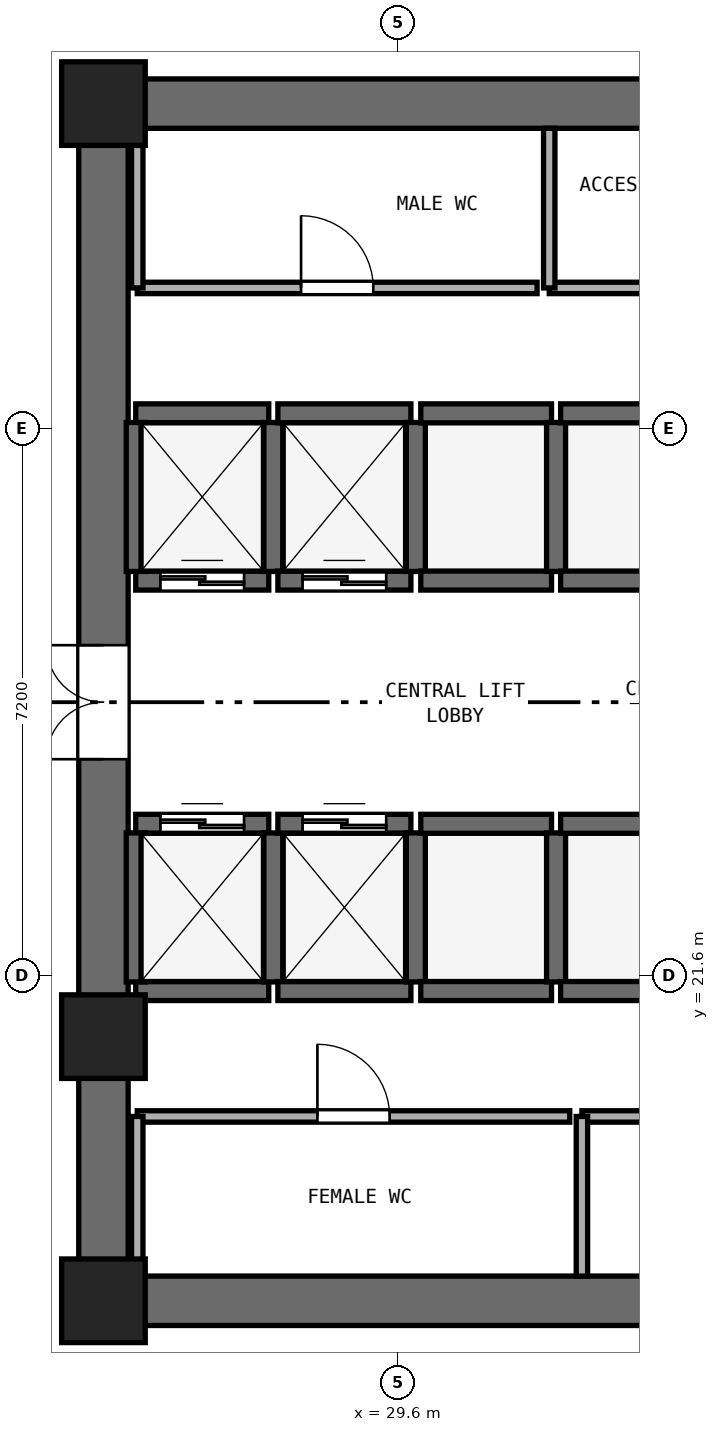
"""IFC4 building model, lengths in metres.
Left out: names, types, materials, properties, quantities, classifications, styles, units other than length and angle.
Written with IfcOpenShell. Run it as: python <this file> out.ifc"""

import sys

from ifc_helpers import new_model, si_unit, direction, frame, frame_2d, origin, origin_2d, place, context, subcontext, project, spatial, rectangle, extrude, element, fill, save


model = new_model("IFC4")
c1 = context("Model", 3, precision=1e-05, world=origin(), true_north=direction((0.0, 1.0)))
c2 = subcontext(c1, "Body", "Model", "MODEL_VIEW")
j1 = project(units=[si_unit("LENGTHUNIT", "METRE"), si_unit("PLANEANGLEUNIT", "RADIAN")], contexts=[c1])
p1 = place(None, origin())
s1 = spatial("IfcSite", under=j1, at=p1, CompositionType="ELEMENT")
p2 = place(p1, origin())
s2 = spatial("IfcBuilding", under=s1, at=p2, CompositionType="ELEMENT")
p3 = place(p2, frame((0.0, 0.0, 28.8)))
s3 = spatial("IfcBuildingStorey", under=s2, at=p3, CompositionType="ELEMENT", Elevation=28.8)
for number, where, z_axis, x_axis in (
    (1, (25.4, 17.325, 0.0), (0.0, 0.0, 1.0), (1.0, 0.0, 0.0)),
    (2, (25.4, 33.075, 0.0), (0.0, 0.0, 1.0), (1.0, 0.0, 0.0)),
):
    element("IfcWall", number, at=place(p3, frame(where, z_axis=z_axis, x_axis=x_axis)), inside=s3, PredefinedType="SHEAR", context=c2, shape_type="SweptSolid", body=[
        extrude(rectangle(XDim=23.2, YDim=0.65, at=frame_2d((11.6, 0.0))), origin(), (0.0, 0.0, 1.0), 3.525),
    ])
p4 = place(p3, frame((25.725, 17.65, 0.0), z_axis=(0.0, 0.0, 1.0), x_axis=(0.0, 1.0, 0.0)))
e3 = element("IfcWall", 3, at=p4, inside=s3, PredefinedType="SHEAR", context=c2, shape_type="SweptSolid", body=[
    extrude(rectangle(XDim=15.1, YDim=0.65, at=frame_2d((7.55, 0.0))), origin(), (0.0, 0.0, 1.0), 3.525),
])
p5 = place(p4, frame((6.8, 0.0, 0.0)))
e4 = element("IfcOpeningElement", 4, at=p5, cuts=e3, PredefinedType="OPENING", context=c2, shape_type="SweptSolid", body=[
    extrude(rectangle(XDim=1.5, YDim=2.15, at=frame_2d((0.75, 1.075))), frame((0.0, 0.335, 0.0), z_axis=(0.0, -1.0, 0.0), x_axis=(1.0, 0.0, 0.0)), (0.0, 0.0, 1.0), 0.67),
])
for number, where, z_axis, x_axis in (
    (5, (25.725, 17.325, 0.0), (0.0, 0.0, 1.0), (1.0, 0.0, 0.0)),
    (6, (25.725, 33.075, 0.0), (0.0, 0.0, 1.0), (1.0, 0.0, 0.0)),
    (7, (25.725, 20.8, 0.0), (0.0, 0.0, 1.0), (1.0, 0.0, 0.0)),
):
    element("IfcColumn", number, at=place(p3, frame(where, z_axis=z_axis, x_axis=x_axis)), inside=s3, PredefinedType="PILASTER", context=c2, shape_type="SweptSolid", body=[
        extrude(rectangle(XDim=1.1, YDim=1.1, at=origin_2d()), origin(), (0.0, 0.0, 1.0), 3.8),
    ])
p6 = place(p3, frame((26.15, 26.8, 0.0), z_axis=(0.0, 0.0, 1.0), x_axis=(1.0, 0.0, 0.0)))
e8 = element("IfcWall", 8, at=p6, inside=s3, PredefinedType="SHEAR", context=c2, shape_type="SweptSolid", body=[
    extrude(rectangle(XDim=1.75, YDim=0.25, at=frame_2d((0.875, 0.0))), origin(), (0.0, 0.0, 1.0), 3.525),
])
p7 = place(p6, frame((0.325, 0.0, 0.0)))
e9 = element("IfcOpeningElement", 9, at=p7, cuts=e8, PredefinedType="OPENING", context=c2, shape_type="SweptSolid", body=[
    extrude(rectangle(XDim=1.1, YDim=2.15, at=frame_2d((0.55, 1.075))), frame((0.0, 0.135, 0.0), z_axis=(0.0, -1.0, 0.0), x_axis=(1.0, 0.0, 0.0)), (0.0, 0.0, 1.0), 0.27),
])
p8 = place(p3, frame((26.15, 29.0, 0.0), z_axis=(0.0, 0.0, 1.0), x_axis=(1.0, 0.0, 0.0)))
e10 = element("IfcWall", 10, at=p8, inside=s3, PredefinedType="SHEAR", context=c2, shape_type="SweptSolid", body=[
    extrude(rectangle(XDim=1.75, YDim=0.25, at=frame_2d((0.875, 0.0))), origin(), (0.0, 0.0, 1.0), 3.525),
])
for number, where, z_axis, x_axis in (
    (11, (26.15, 26.92, 0.0), (0.0, 0.0, 1.0), (0.0, 1.0, 0.0)),
    (12, (27.96, 26.92, 0.0), (0.0, 0.0, 1.0), (0.0, 1.0, 0.0)),
):
    element("IfcWall", number, at=place(p3, frame(where, z_axis=z_axis, x_axis=x_axis)), inside=s3, PredefinedType="SHEAR", context=c2, shape_type="SweptSolid", body=[
        extrude(rectangle(XDim=1.96, YDim=0.25, at=frame_2d((0.98, 0.0))), origin(), (0.0, 0.0, 1.0), 3.525),
    ])
p9 = place(p3, frame((28.02, 26.8, 0.0), z_axis=(0.0, 0.0, 1.0), x_axis=(1.0, 0.0, 0.0)))
e13 = element("IfcWall", 13, at=p9, inside=s3, PredefinedType="SHEAR", context=c2, shape_type="SweptSolid", body=[
    extrude(rectangle(XDim=1.75, YDim=0.25, at=frame_2d((0.875, 0.0))), origin(), (0.0, 0.0, 1.0), 3.525),
])
p10 = place(p9, frame((0.325, 0.0, 0.0)))
e14 = element("IfcOpeningElement", 14, at=p10, cuts=e13, PredefinedType="OPENING", context=c2, shape_type="SweptSolid", body=[
    extrude(rectangle(XDim=1.1, YDim=2.15, at=frame_2d((0.55, 1.075))), frame((0.0, 0.135, 0.0), z_axis=(0.0, -1.0, 0.0), x_axis=(1.0, 0.0, 0.0)), (0.0, 0.0, 1.0), 0.27),
])
p11 = place(p3, frame((28.02, 29.0, 0.0), z_axis=(0.0, 0.0, 1.0), x_axis=(1.0, 0.0, 0.0)))
e15 = element("IfcWall", 15, at=p11, inside=s3, PredefinedType="SHEAR", context=c2, shape_type="SweptSolid", body=[
    extrude(rectangle(XDim=1.75, YDim=0.25, at=frame_2d((0.875, 0.0))), origin(), (0.0, 0.0, 1.0), 3.525),
])
p12 = place(p3, frame((29.835, 26.92, 0.0), z_axis=(0.0, 0.0, 1.0), x_axis=(0.0, 1.0, 0.0)))
e16 = element("IfcWall", 16, at=p12, inside=s3, PredefinedType="SHEAR", context=c2, shape_type="SweptSolid", body=[
    extrude(rectangle(XDim=1.96, YDim=0.25, at=frame_2d((0.98, 0.0))), origin(), (0.0, 0.0, 1.0), 3.525),
])
p13 = place(p3, frame((26.15, 21.4, 0.0), z_axis=(0.0, 0.0, 1.0), x_axis=(1.0, 0.0, 0.0)))
e17 = element("IfcWall", 17, at=p13, inside=s3, PredefinedType="SHEAR", context=c2, shape_type="SweptSolid", body=[
    extrude(rectangle(XDim=1.75, YDim=0.25, at=frame_2d((0.875, 0.0))), origin(), (0.0, 0.0, 1.0), 3.525),
])
p14 = place(p3, frame((26.15, 23.6, 0.0), z_axis=(0.0, 0.0, 1.0), x_axis=(1.0, 0.0, 0.0)))
e18 = element("IfcWall", 18, at=p14, inside=s3, PredefinedType="SHEAR", context=c2, shape_type="SweptSolid", body=[
    extrude(rectangle(XDim=1.75, YDim=0.25, at=frame_2d((0.875, 0.0))), origin(), (0.0, 0.0, 1.0), 3.525),
])
p15 = place(p14, frame((0.325, 0.0, 0.0)))
e19 = element("IfcOpeningElement", 19, at=p15, cuts=e18, PredefinedType="OPENING", context=c2, shape_type="SweptSolid", body=[
    extrude(rectangle(XDim=1.1, YDim=2.15, at=frame_2d((0.55, 1.075))), frame((0.0, 0.135, 0.0), z_axis=(0.0, -1.0, 0.0), x_axis=(1.0, 0.0, 0.0)), (0.0, 0.0, 1.0), 0.27),
])
for number, where, z_axis, x_axis in (
    (20, (26.15, 21.52, 0.0), (0.0, 0.0, 1.0), (0.0, 1.0, 0.0)),
    (21, (27.96, 21.52, 0.0), (0.0, 0.0, 1.0), (0.0, 1.0, 0.0)),
):
    element("IfcWall", number, at=place(p3, frame(where, z_axis=z_axis, x_axis=x_axis)), inside=s3, PredefinedType="SHEAR", context=c2, shape_type="SweptSolid", body=[
        extrude(rectangle(XDim=1.96, YDim=0.25, at=frame_2d((0.98, 0.0))), origin(), (0.0, 0.0, 1.0), 3.525),
    ])
p16 = place(p3, frame((28.02, 21.4, 0.0), z_axis=(0.0, 0.0, 1.0), x_axis=(1.0, 0.0, 0.0)))
e22 = element("IfcWall", 22, at=p16, inside=s3, PredefinedType="SHEAR", context=c2, shape_type="SweptSolid", body=[
    extrude(rectangle(XDim=1.75, YDim=0.25, at=frame_2d((0.875, 0.0))), origin(), (0.0, 0.0, 1.0), 3.525),
])
p17 = place(p3, frame((28.02, 23.6, 0.0), z_axis=(0.0, 0.0, 1.0), x_axis=(1.0, 0.0, 0.0)))
e23 = element("IfcWall", 23, at=p17, inside=s3, PredefinedType="SHEAR", context=c2, shape_type="SweptSolid", body=[
    extrude(rectangle(XDim=1.75, YDim=0.25, at=frame_2d((0.875, 0.0))), origin(), (0.0, 0.0, 1.0), 3.525),
])
p18 = place(p17, frame((0.325, 0.0, 0.0)))
e24 = element("IfcOpeningElement", 24, at=p18, cuts=e23, PredefinedType="OPENING", context=c2, shape_type="SweptSolid", body=[
    extrude(rectangle(XDim=1.1, YDim=2.15, at=frame_2d((0.55, 1.075))), frame((0.0, 0.135, 0.0), z_axis=(0.0, -1.0, 0.0), x_axis=(1.0, 0.0, 0.0)), (0.0, 0.0, 1.0), 0.27),
])
p19 = place(p3, frame((29.835, 21.52, 0.0), z_axis=(0.0, 0.0, 1.0), x_axis=(0.0, 1.0, 0.0)))
e25 = element("IfcWall", 25, at=p19, inside=s3, PredefinedType="SHEAR", context=c2, shape_type="SweptSolid", body=[
    extrude(rectangle(XDim=1.96, YDim=0.25, at=frame_2d((0.98, 0.0))), origin(), (0.0, 0.0, 1.0), 3.525),
])
for number, where, z_axis, x_axis in (
    (26, (29.9, 21.4, 0.0), (0.0, 0.0, 1.0), (1.0, 0.0, 0.0)),
    (27, (29.9, 23.6, 0.0), (0.0, 0.0, 1.0), (1.0, 0.0, 0.0)),
):
    element("IfcWall", number, at=place(p3, frame(where, z_axis=z_axis, x_axis=x_axis)), inside=s3, PredefinedType="SHEAR", context=c2, shape_type="SweptSolid", body=[
        extrude(rectangle(XDim=1.72, YDim=0.25, at=frame_2d((0.86, 0.0))), origin(), (0.0, 0.0, 1.0), 3.525),
    ])
p20 = place(p3, frame((31.68, 21.52, 0.0), z_axis=(0.0, 0.0, 1.0), x_axis=(0.0, 1.0, 0.0)))
e28 = element("IfcWall", 28, at=p20, inside=s3, PredefinedType="SHEAR", context=c2, shape_type="SweptSolid", body=[
    extrude(rectangle(XDim=1.96, YDim=0.25, at=frame_2d((0.98, 0.0))), origin(), (0.0, 0.0, 1.0), 3.525),
])
for number, where, z_axis, x_axis in (
    (29, (31.74, 21.4, 0.0), (0.0, 0.0, 1.0), (1.0, 0.0, 0.0)),
    (30, (31.74, 23.6, 0.0), (0.0, 0.0, 1.0), (1.0, 0.0, 0.0)),
):
    element("IfcWall", number, at=place(p3, frame(where, z_axis=z_axis, x_axis=x_axis)), inside=s3, PredefinedType="SHEAR", context=c2, shape_type="SweptSolid", body=[
        extrude(rectangle(XDim=1.72, YDim=0.25, at=frame_2d((0.86, 0.0))), origin(), (0.0, 0.0, 1.0), 3.525),
    ])
for number, where, z_axis, x_axis in (
    (31, (29.9, 26.8, 0.0), (0.0, 0.0, 1.0), (1.0, 0.0, 0.0)),
    (32, (29.9, 29.0, 0.0), (0.0, 0.0, 1.0), (1.0, 0.0, 0.0)),
):
    element("IfcWall", number, at=place(p3, frame(where, z_axis=z_axis, x_axis=x_axis)), inside=s3, PredefinedType="SHEAR", context=c2, shape_type="SweptSolid", body=[
        extrude(rectangle(XDim=1.72, YDim=0.25, at=frame_2d((0.86, 0.0))), origin(), (0.0, 0.0, 1.0), 3.525),
    ])
p21 = place(p3, frame((31.68, 26.92, 0.0), z_axis=(0.0, 0.0, 1.0), x_axis=(0.0, 1.0, 0.0)))
e33 = element("IfcWall", 33, at=p21, inside=s3, PredefinedType="SHEAR", context=c2, shape_type="SweptSolid", body=[
    extrude(rectangle(XDim=1.96, YDim=0.25, at=frame_2d((0.98, 0.0))), origin(), (0.0, 0.0, 1.0), 3.525),
])
for number, where, z_axis, x_axis in (
    (34, (31.74, 26.8, 0.0), (0.0, 0.0, 1.0), (1.0, 0.0, 0.0)),
    (35, (31.74, 29.0, 0.0), (0.0, 0.0, 1.0), (1.0, 0.0, 0.0)),
):
    element("IfcWall", number, at=place(p3, frame(where, z_axis=z_axis, x_axis=x_axis)), inside=s3, PredefinedType="SHEAR", context=c2, shape_type="SweptSolid", body=[
        extrude(rectangle(XDim=1.72, YDim=0.25, at=frame_2d((0.86, 0.0))), origin(), (0.0, 0.0, 1.0), 3.525),
    ])
p22 = place(p3, frame((26.17, 30.65, 0.0), z_axis=(0.0, 0.0, 1.0), x_axis=(1.0, 0.0, 0.0)))
e36 = element("IfcWall", 36, at=p22, inside=s3, PredefinedType="PARTITIONING", context=c2, shape_type="SweptSolid", body=[
    extrude(rectangle(XDim=5.26, YDim=0.15, at=frame_2d((2.63, 0.0))), origin(), (0.0, 0.0, 1.0), 3.525),
])
p23 = place(p22, frame((2.155, 0.0, 0.0)))
e37 = element("IfcOpeningElement", 37, at=p23, cuts=e36, PredefinedType="OPENING", context=c2, shape_type="SweptSolid", body=[
    extrude(rectangle(XDim=0.95, YDim=2.1, at=frame_2d((0.475, 1.05))), frame((0.0, 0.085, 0.0), z_axis=(0.0, -1.0, 0.0), x_axis=(1.0, 0.0, 0.0)), (0.0, 0.0, 1.0), 0.17),
])
p24 = place(p3, frame((26.17, 30.65, 0.0), z_axis=(0.0, 0.0, 1.0), x_axis=(0.0, 1.0, 0.0)))
e38 = element("IfcWall", 38, at=p24, inside=s3, PredefinedType="PARTITIONING", context=c2, shape_type="SweptSolid", body=[
    extrude(rectangle(XDim=2.1, YDim=0.15, at=frame_2d((1.05, 0.0))), origin(), (0.0, 0.0, 1.0), 3.525),
])
p25 = place(p3, frame((31.59, 30.65, 0.0), z_axis=(0.0, 0.0, 1.0), x_axis=(1.0, 0.0, 0.0)))
e39 = element("IfcWall", 39, at=p25, inside=s3, PredefinedType="PARTITIONING", context=c2, shape_type="SweptSolid", body=[
    extrude(rectangle(XDim=5.26, YDim=0.15, at=frame_2d((2.63, 0.0))), origin(), (0.0, 0.0, 1.0), 3.525),
])
p26 = place(p25, frame((2.155, 0.0, 0.0)))
e40 = element("IfcOpeningElement", 40, at=p26, cuts=e39, PredefinedType="OPENING", context=c2, shape_type="SweptSolid", body=[
    extrude(rectangle(XDim=0.95, YDim=2.1, at=frame_2d((0.475, 1.05))), frame((0.0, 0.085, 0.0), z_axis=(0.0, -1.0, 0.0), x_axis=(1.0, 0.0, 0.0)), (0.0, 0.0, 1.0), 0.17),
])
p27 = place(p3, frame((31.59, 30.65, 0.0), z_axis=(0.0, 0.0, 1.0), x_axis=(0.0, 1.0, 0.0)))
e41 = element("IfcWall", 41, at=p27, inside=s3, PredefinedType="PARTITIONING", context=c2, shape_type="SweptSolid", body=[
    extrude(rectangle(XDim=2.1, YDim=0.15, at=frame_2d((1.05, 0.0))), origin(), (0.0, 0.0, 1.0), 3.525),
])
p28 = place(p3, frame((26.17, 19.75, 0.0), z_axis=(0.0, 0.0, 1.0), x_axis=(1.0, 0.0, 0.0)))
e42 = element("IfcWall", 42, at=p28, inside=s3, PredefinedType="PARTITIONING", context=c2, shape_type="SweptSolid", body=[
    extrude(rectangle(XDim=5.69, YDim=0.15, at=frame_2d((2.845, 0.0))), origin(), (0.0, 0.0, 1.0), 3.525),
])
p29 = place(p28, frame((2.37, 0.0, 0.0)))
e43 = element("IfcOpeningElement", 43, at=p29, cuts=e42, PredefinedType="OPENING", context=c2, shape_type="SweptSolid", body=[
    extrude(rectangle(XDim=0.95, YDim=2.1, at=frame_2d((0.475, 1.05))), frame((0.0, 0.085, 0.0), z_axis=(0.0, -1.0, 0.0), x_axis=(1.0, 0.0, 0.0)), (0.0, 0.0, 1.0), 0.17),
])
p30 = place(p3, frame((26.17, 17.65, 0.0), z_axis=(0.0, 0.0, 1.0), x_axis=(0.0, 1.0, 0.0)))
e44 = element("IfcWall", 44, at=p30, inside=s3, PredefinedType="PARTITIONING", context=c2, shape_type="SweptSolid", body=[
    extrude(rectangle(XDim=2.1, YDim=0.15, at=frame_2d((1.05, 0.0))), origin(), (0.0, 0.0, 1.0), 3.525),
])
p31 = place(p3, frame((32.02, 19.75, 0.0), z_axis=(0.0, 0.0, 1.0), x_axis=(1.0, 0.0, 0.0)))
e45 = element("IfcWall", 45, at=p31, inside=s3, PredefinedType="PARTITIONING", context=c2, shape_type="SweptSolid", body=[
    extrude(rectangle(XDim=4.83, YDim=0.15, at=frame_2d((2.415, 0.0))), origin(), (0.0, 0.0, 1.0), 3.525),
])
p32 = place(p31, frame((1.965, 0.0, 0.0)))
e46 = element("IfcOpeningElement", 46, at=p32, cuts=e45, PredefinedType="OPENING", context=c2, shape_type="SweptSolid", body=[
    extrude(rectangle(XDim=0.9, YDim=2.1, at=frame_2d((0.45, 1.05))), frame((0.0, 0.085, 0.0), z_axis=(0.0, -1.0, 0.0), x_axis=(1.0, 0.0, 0.0)), (0.0, 0.0, 1.0), 0.17),
])
p33 = place(p3, frame((32.02, 17.65, 0.0), z_axis=(0.0, 0.0, 1.0), x_axis=(0.0, 1.0, 0.0)))
e47 = element("IfcWall", 47, at=p33, inside=s3, PredefinedType="PARTITIONING", context=c2, shape_type="SweptSolid", body=[
    extrude(rectangle(XDim=2.1, YDim=0.15, at=frame_2d((1.05, 0.0))), origin(), (0.0, 0.0, 1.0), 3.525),
])
p34 = place(p7, origin())
e48 = element("IfcDoor", 48, at=p34, inside=s3, OperationType="DOUBLE_DOOR_SLIDING", PredefinedType="DOOR", context=c2, shape_type="SweptSolid", body=[
    extrude(rectangle(XDim=1.1, YDim=2.15, at=frame_2d((0.55, 1.075))), frame((0.0, 0.025, 0.0), z_axis=(0.0, -1.0, 0.0), x_axis=(1.0, 0.0, 0.0)), (0.0, 0.0, 1.0), 0.05),
])
fill(e9, e48)
p35 = place(p10, origin())
e49 = element("IfcDoor", 49, at=p35, inside=s3, OperationType="DOUBLE_DOOR_SLIDING", PredefinedType="DOOR", context=c2, shape_type="SweptSolid", body=[
    extrude(rectangle(XDim=1.1, YDim=2.15, at=frame_2d((0.55, 1.075))), frame((0.0, 0.025, 0.0), z_axis=(0.0, -1.0, 0.0), x_axis=(1.0, 0.0, 0.0)), (0.0, 0.0, 1.0), 0.05),
])
fill(e14, e49)
p36 = place(p15, origin())
e50 = element("IfcDoor", 50, at=p36, inside=s3, OperationType="DOUBLE_DOOR_SLIDING", PredefinedType="DOOR", context=c2, shape_type="SweptSolid", body=[
    extrude(rectangle(XDim=1.1, YDim=2.15, at=frame_2d((0.55, 1.075))), frame((0.0, 0.025, 0.0), z_axis=(0.0, -1.0, 0.0), x_axis=(1.0, 0.0, 0.0)), (0.0, 0.0, 1.0), 0.05),
])
fill(e19, e50)
p37 = place(p18, origin())
e51 = element("IfcDoor", 51, at=p37, inside=s3, OperationType="DOUBLE_DOOR_SLIDING", PredefinedType="DOOR", context=c2, shape_type="SweptSolid", body=[
    extrude(rectangle(XDim=1.1, YDim=2.15, at=frame_2d((0.55, 1.075))), frame((0.0, 0.025, 0.0), z_axis=(0.0, -1.0, 0.0), x_axis=(1.0, 0.0, 0.0)), (0.0, 0.0, 1.0), 0.05),
])
fill(e24, e51)
p38 = place(p5, origin())
e52 = element("IfcDoor", 52, at=p38, inside=s3, OperationType="DOUBLE_DOOR_SINGLE_SWING", PredefinedType="DOOR", context=c2, shape_type="SweptSolid", body=[
    extrude(rectangle(XDim=1.5, YDim=2.15, at=frame_2d((0.75, 1.075))), frame((0.0, 0.025, 0.0), z_axis=(0.0, -1.0, 0.0), x_axis=(1.0, 0.0, 0.0)), (0.0, 0.0, 1.0), 0.05),
])
fill(e4, e52)
p39 = place(p23, origin())
e53 = element("IfcDoor", 53, at=p39, inside=s3, OperationType="SINGLE_SWING_LEFT", PredefinedType="DOOR", context=c2, shape_type="SweptSolid", body=[
    extrude(rectangle(XDim=0.95, YDim=2.1, at=frame_2d((0.475, 1.05))), frame((0.0, 0.025, 0.0), z_axis=(0.0, -1.0, 0.0), x_axis=(1.0, 0.0, 0.0)), (0.0, 0.0, 1.0), 0.05),
])
fill(e37, e53)
p40 = place(p29, origin())
e54 = element("IfcDoor", 54, at=p40, inside=s3, OperationType="SINGLE_SWING_LEFT", PredefinedType="DOOR", context=c2, shape_type="SweptSolid", body=[
    extrude(rectangle(XDim=0.95, YDim=2.1, at=frame_2d((0.475, 1.05))), frame((0.0, 0.025, 0.0), z_axis=(0.0, -1.0, 0.0), x_axis=(1.0, 0.0, 0.0)), (0.0, 0.0, 1.0), 0.05),
])
fill(e43, e54)
save(model, sys.argv[1])
